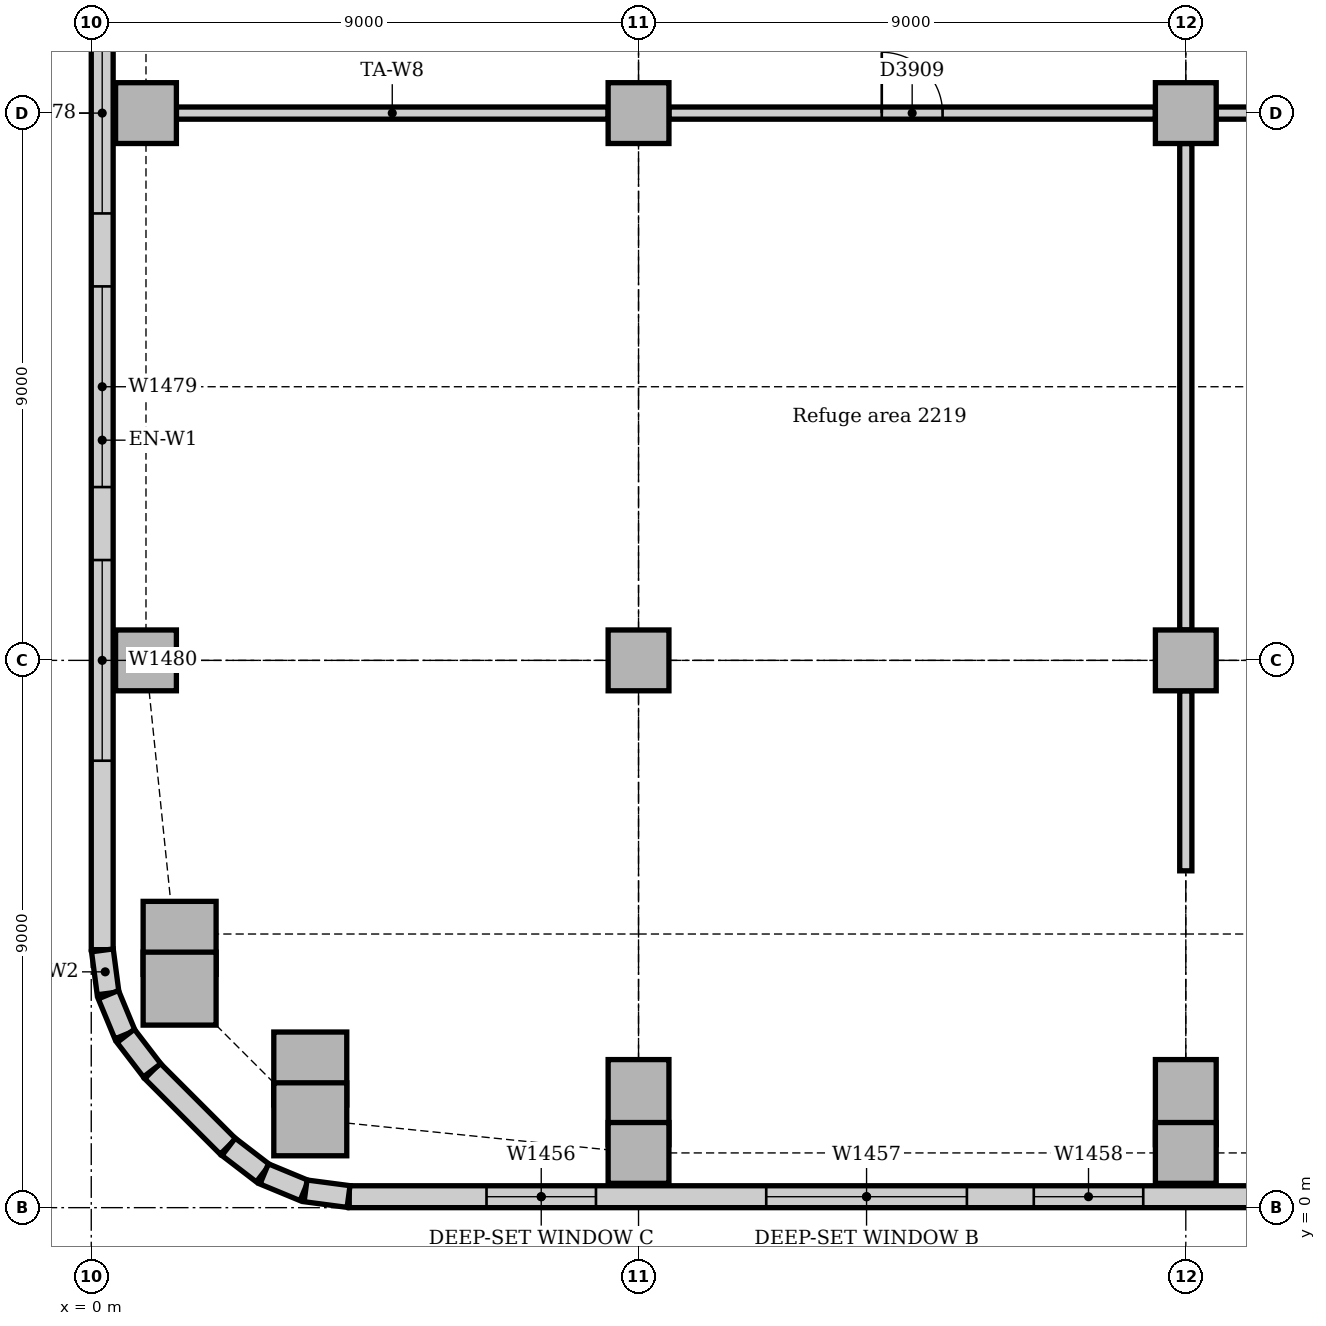
"""IFC4 building model, lengths in metres.
Left out: names, types, materials, properties, quantities, classifications, styles, units other than length and angle.
Written with IfcOpenShell. Run it as: python <this file> out.ifc"""

import sys

from ifc_helpers import new_model, si_unit, direction, frame, frame_2d, origin, origin_2d, place, context, subcontext, project, spatial, rectangle, extrude, element, fill, save


model = new_model("IFC4")
c1 = context("Model", 3, precision=1e-05, world=origin(), true_north=direction((0.0, 1.0)))
c2 = subcontext(c1, "Body", "Model", "MODEL_VIEW")
j1 = project(units=[si_unit("LENGTHUNIT", "METRE"), si_unit("PLANEANGLEUNIT", "RADIAN")], contexts=[c1])
p1 = place(None, origin())
s1 = spatial("IfcSite", under=j1, at=p1, CompositionType="ELEMENT")
p2 = place(p1, origin())
s2 = spatial("IfcBuilding", under=s1, at=p2, CompositionType="ELEMENT")
p3 = place(p2, frame((0.0, 0.0, 95.0)))
s3 = spatial("IfcBuildingStorey", under=s2, at=p3, CompositionType="ELEMENT", Elevation=95.0)
for number, where, z_axis, x_axis in (
    (1, (3.602, 1.453, 0.0), (0.0, 0.0, 1.0), (1.0, 0.0, 0.0)),
    (2, (1.453, 3.602, 0.0), (0.0, 0.0, 1.0), (1.0, 0.0, 0.0)),
):
    element("IfcColumn", number, at=place(p3, frame(where, z_axis=z_axis, x_axis=x_axis)), inside=s3, PredefinedType="COLUMN", context=c2, shape_type="SweptSolid", body=[
        extrude(rectangle(XDim=1.2, YDim=1.2, at=origin_2d()), origin(), (0.0, 0.0, 1.0), 4.85),
    ])
for number, where, z_axis, x_axis in (
    (3, (9.0, 0.9, 0.0), (0.0, 0.0, 1.0), (1.0, 0.0, 0.0)),
    (4, (18.0, 0.9, 0.0), (0.0, 0.0, 1.0), (1.0, 0.0, 0.0)),
    (5, (0.9, 9.0, 0.0), (0.0, 0.0, 1.0), (1.0, 0.0, 0.0)),
    (6, (0.9, 18.0, 0.0), (0.0, 0.0, 1.0), (1.0, 0.0, 0.0)),
    (7, (9.0, 9.0, 0.0), (0.0, 0.0, 1.0), (1.0, 0.0, 0.0)),
    (8, (9.0, 18.0, 0.0), (0.0, 0.0, 1.0), (1.0, 0.0, 0.0)),
    (9, (18.0, 9.0, 0.0), (0.0, 0.0, 1.0), (1.0, 0.0, 0.0)),
    (10, (18.0, 18.0, 0.0), (0.0, 0.0, 1.0), (1.0, 0.0, 0.0)),
):
    element("IfcColumn", number, at=place(p3, frame(where, z_axis=z_axis, x_axis=x_axis)), inside=s3, PredefinedType="COLUMN", context=c2, shape_type="SweptSolid", body=[
        extrude(rectangle(XDim=1.0, YDim=1.0, at=origin_2d()), origin(), (0.0, 0.0, 1.0), 4.85),
    ])
p4 = place(p3, frame((4.243, 0.18, 0.0), z_axis=(0.0, 0.0, 1.0), x_axis=(1.0, 0.0, 0.0)))
e11 = element("IfcWall", 11, at=p4, inside=s3, PredefinedType="STANDARD", context=c2, shape_type="SweptSolid", body=[
    extrude(rectangle(XDim=44.015, YDim=0.36, at=frame_2d((22.007, 0.0))), origin(), (0.0, 0.0, 1.0), 4.85),
])
p5 = place(p4, frame((2.257, 0.0, 1.2)))
e12 = element("IfcOpeningElement", 12, at=p5, cuts=e11, PredefinedType="OPENING", context=c2, shape_type="SweptSolid", body=[
    extrude(rectangle(XDim=1.8, YDim=1.2, at=frame_2d((0.9, 0.6))), frame((0.0, 0.19, 0.0), z_axis=(0.0, -1.0, 0.0), x_axis=(1.0, 0.0, 0.0)), (0.0, 0.0, 1.0), 0.38),
])
p6 = place(p4, frame((6.857, 0.0, 0.9)))
e13 = element("IfcOpeningElement", 13, at=p6, cuts=e11, PredefinedType="OPENING", context=c2, shape_type="SweptSolid", body=[
    extrude(rectangle(XDim=3.3, YDim=2.2, at=frame_2d((1.65, 1.1))), frame((0.0, 0.19, 0.0), z_axis=(0.0, -1.0, 0.0), x_axis=(1.0, 0.0, 0.0)), (0.0, 0.0, 1.0), 0.38),
])
p7 = place(p4, frame((11.257, 0.0, 1.2)))
e14 = element("IfcOpeningElement", 14, at=p7, cuts=e11, PredefinedType="OPENING", context=c2, shape_type="SweptSolid", body=[
    extrude(rectangle(XDim=1.8, YDim=1.2, at=frame_2d((0.9, 0.6))), frame((0.0, 0.19, 0.0), z_axis=(0.0, -1.0, 0.0), x_axis=(1.0, 0.0, 0.0)), (0.0, 0.0, 1.0), 0.38),
])
p8 = place(p4, frame((15.857, 0.0, 0.9)))
e15 = element("IfcOpeningElement", 15, at=p8, cuts=e11, PredefinedType="OPENING", context=c2, shape_type="SweptSolid", body=[
    extrude(rectangle(XDim=3.3, YDim=2.2, at=frame_2d((1.65, 1.1))), frame((0.0, 0.19, 0.0), z_axis=(0.0, -1.0, 0.0), x_axis=(1.0, 0.0, 0.0)), (0.0, 0.0, 1.0), 0.38),
])
p9 = place(p4, frame((20.257, 0.0, 1.2)))
e16 = element("IfcOpeningElement", 16, at=p9, cuts=e11, PredefinedType="OPENING", context=c2, shape_type="SweptSolid", body=[
    extrude(rectangle(XDim=1.8, YDim=1.2, at=frame_2d((0.9, 0.6))), frame((0.0, 0.19, 0.0), z_axis=(0.0, -1.0, 0.0), x_axis=(1.0, 0.0, 0.0)), (0.0, 0.0, 1.0), 0.38),
])
p10 = place(p4, frame((24.857, 0.0, 0.9)))
e17 = element("IfcOpeningElement", 17, at=p10, cuts=e11, PredefinedType="OPENING", context=c2, shape_type="SweptSolid", body=[
    extrude(rectangle(XDim=3.3, YDim=2.2, at=frame_2d((1.65, 1.1))), frame((0.0, 0.19, 0.0), z_axis=(0.0, -1.0, 0.0), x_axis=(1.0, 0.0, 0.0)), (0.0, 0.0, 1.0), 0.38),
])
p11 = place(p4, frame((29.257, 0.0, 1.2)))
e18 = element("IfcOpeningElement", 18, at=p11, cuts=e11, PredefinedType="OPENING", context=c2, shape_type="SweptSolid", body=[
    extrude(rectangle(XDim=1.8, YDim=1.2, at=frame_2d((0.9, 0.6))), frame((0.0, 0.19, 0.0), z_axis=(0.0, -1.0, 0.0), x_axis=(1.0, 0.0, 0.0)), (0.0, 0.0, 1.0), 0.38),
])
p12 = place(p4, frame((33.857, 0.0, 0.9)))
e19 = element("IfcOpeningElement", 19, at=p12, cuts=e11, PredefinedType="OPENING", context=c2, shape_type="SweptSolid", body=[
    extrude(rectangle(XDim=3.3, YDim=2.2, at=frame_2d((1.65, 1.1))), frame((0.0, 0.19, 0.0), z_axis=(0.0, -1.0, 0.0), x_axis=(1.0, 0.0, 0.0)), (0.0, 0.0, 1.0), 0.38),
])
p13 = place(p4, frame((38.583, 0.0, 0.9)))
e20 = element("IfcOpeningElement", 20, at=p13, cuts=e11, PredefinedType="OPENING", context=c2, shape_type="SweptSolid", body=[
    extrude(rectangle(XDim=1.8, YDim=2.2, at=frame_2d((0.9, 1.1))), frame((0.0, 0.19, 0.0), z_axis=(0.0, -1.0, 0.0), x_axis=(1.0, 0.0, 0.0)), (0.0, 0.0, 1.0), 0.38),
])
p14 = place(p3, frame((0.18, 21.0, 0.0), z_axis=(0.0, 0.0, 1.0), x_axis=(0.0, -1.0, 0.0)))
e21 = element("IfcWall", 21, at=p14, inside=s3, PredefinedType="STANDARD", context=c2, shape_type="SweptSolid", body=[
    extrude(rectangle(XDim=16.757, YDim=0.36, at=frame_2d((8.379, 0.0))), origin(), (0.0, 0.0, 1.0), 4.85),
])
p15 = place(p14, frame((1.35, 0.0, 0.9)))
e22 = element("IfcOpeningElement", 22, at=p15, cuts=e21, PredefinedType="OPENING", context=c2, shape_type="SweptSolid", body=[
    extrude(rectangle(XDim=3.3, YDim=2.2, at=frame_2d((1.65, 1.1))), frame((0.0, 0.19, 0.0), z_axis=(0.0, -1.0, 0.0), x_axis=(1.0, 0.0, 0.0)), (0.0, 0.0, 1.0), 0.38),
])
p16 = place(p14, frame((5.85, 0.0, 0.9)))
e23 = element("IfcOpeningElement", 23, at=p16, cuts=e21, PredefinedType="OPENING", context=c2, shape_type="SweptSolid", body=[
    extrude(rectangle(XDim=3.3, YDim=2.2, at=frame_2d((1.65, 1.1))), frame((0.0, 0.19, 0.0), z_axis=(0.0, -1.0, 0.0), x_axis=(1.0, 0.0, 0.0)), (0.0, 0.0, 1.0), 0.38),
])
p17 = place(p14, frame((10.35, 0.0, 0.9)))
e24 = element("IfcOpeningElement", 24, at=p17, cuts=e21, PredefinedType="OPENING", context=c2, shape_type="SweptSolid", body=[
    extrude(rectangle(XDim=3.3, YDim=2.2, at=frame_2d((1.65, 1.1))), frame((0.0, 0.19, 0.0), z_axis=(0.0, -1.0, 0.0), x_axis=(1.0, 0.0, 0.0)), (0.0, 0.0, 1.0), 0.38),
])
p18 = place(p3, frame((1.006, 2.249, 0.0), z_axis=(0.0, 0.0, 1.0), x_axis=(0.707106781187, -0.707106781187, 0.0)))
e25 = element("IfcWall", 25, at=p18, inside=s3, PredefinedType="STANDARD", context=c2, shape_type="SweptSolid", body=[
    extrude(rectangle(XDim=1.757, YDim=0.36, at=frame_2d((0.879, 0.0))), origin(), (0.0, 0.0, 1.0), 4.85),
])
for number, where, z_axis, x_axis in (
    (26, (0.183, 4.231, 0.0), (0.0, 0.0, 1.0), (0.131, -0.991, 0.0)),
    (27, (0.282, 3.503, 0.0), (0.0, 0.0, 1.0), (0.383, -0.924, 0.0)),
):
    element("IfcWall", number, at=place(p3, frame(where, z_axis=z_axis, x_axis=x_axis)), inside=s3, PredefinedType="STANDARD", context=c2, shape_type="SweptSolid", body=[
        extrude(rectangle(XDim=0.713, YDim=0.36, at=frame_2d((0.356, 0.0))), origin(), (0.0, 0.0, 1.0), 4.85),
    ])
for number, where, z_axis, x_axis in (
    (28, (0.566, 2.825, 0.0), (0.0, 0.0, 1.0), (0.609, -0.793, 0.0)),
    (29, (2.259, 1.0, 0.0), (0.0, 0.0, 1.0), (0.793, -0.609, 0.0)),
):
    element("IfcWall", number, at=place(p3, frame(where, z_axis=z_axis, x_axis=x_axis)), inside=s3, PredefinedType="STANDARD", context=c2, shape_type="SweptSolid", body=[
        extrude(rectangle(XDim=0.713, YDim=0.36, at=frame_2d((0.357, 0.0))), origin(), (0.0, 0.0, 1.0), 4.85),
    ])
for number, where, z_axis, x_axis in (
    (30, (2.844, 0.555, 0.0), (0.0, 0.0, 1.0), (0.924, -0.383, 0.0)),
    (31, (3.524, 0.276, 0.0), (0.0, 0.0, 1.0), (0.991, -0.131, 0.0)),
):
    element("IfcWall", number, at=place(p3, frame(where, z_axis=z_axis, x_axis=x_axis)), inside=s3, PredefinedType="STANDARD", context=c2, shape_type="SweptSolid", body=[
        extrude(rectangle(XDim=0.713, YDim=0.36, at=frame_2d((0.356, 0.0))), origin(), (0.0, 0.0, 1.0), 4.85),
    ])
p19 = place(p3, frame((18.5, 18.0, 0.0), z_axis=(0.0, 0.0, 1.0), x_axis=(1.0, 0.0, 0.0)))
e32 = element("IfcWall", 32, at=p19, inside=s3, PredefinedType="PARTITIONING", context=c2, shape_type="SweptSolid", body=[
    extrude(rectangle(XDim=8.0, YDim=0.2, at=frame_2d((4.0, 0.0))), origin(), (0.0, 0.0, 1.0), 4.158),
])
p20 = place(p19, frame((3.5, 0.0, 0.0)))
e33 = element("IfcOpeningElement", 33, at=p20, cuts=e32, PredefinedType="OPENING", context=c2, shape_type="SweptSolid", body=[
    extrude(rectangle(XDim=1.0, YDim=2.1, at=frame_2d((0.5, 1.05))), frame((0.0, 0.11, 0.0), z_axis=(0.0, -1.0, 0.0), x_axis=(1.0, 0.0, 0.0)), (0.0, 0.0, 1.0), 0.22),
])
p21 = place(p3, frame((9.5, 18.0, 0.0), z_axis=(0.0, 0.0, 1.0), x_axis=(1.0, 0.0, 0.0)))
e34 = element("IfcWall", 34, at=p21, inside=s3, PredefinedType="PARTITIONING", context=c2, shape_type="SweptSolid", body=[
    extrude(rectangle(XDim=8.0, YDim=0.2, at=frame_2d((4.0, 0.0))), origin(), (0.0, 0.0, 1.0), 4.158),
])
p22 = place(p21, frame((3.5, 0.0, 0.0)))
e35 = element("IfcOpeningElement", 35, at=p22, cuts=e34, PredefinedType="OPENING", context=c2, shape_type="SweptSolid", body=[
    extrude(rectangle(XDim=1.0, YDim=2.1, at=frame_2d((0.5, 1.05))), frame((0.0, 0.11, 0.0), z_axis=(0.0, -1.0, 0.0), x_axis=(1.0, 0.0, 0.0)), (0.0, 0.0, 1.0), 0.22),
])
p23 = place(p3, frame((1.4, 18.0, 0.0), z_axis=(0.0, 0.0, 1.0), x_axis=(1.0, 0.0, 0.0)))
e36 = element("IfcWall", 36, at=p23, inside=s3, PredefinedType="PARTITIONING", context=c2, shape_type="SweptSolid", body=[
    extrude(rectangle(XDim=7.1, YDim=0.2, at=frame_2d((3.55, 0.0))), origin(), (0.0, 0.0, 1.0), 4.158),
])
p24 = place(p3, frame((18.0, 5.539, 0.0), z_axis=(0.0, 0.0, 1.0), x_axis=(0.0, 1.0, 0.0)))
e37 = element("IfcWall", 37, at=p24, inside=s3, PredefinedType="PARTITIONING", context=c2, shape_type="SweptSolid", body=[
    extrude(rectangle(XDim=2.961, YDim=0.2, at=frame_2d((1.48, 0.0))), origin(), (0.0, 0.0, 1.0), 4.85),
])
p25 = place(p3, frame((18.0, 9.5, 0.0), z_axis=(0.0, 0.0, 1.0), x_axis=(0.0, 1.0, 0.0)))
e38 = element("IfcWall", 38, at=p25, inside=s3, PredefinedType="PARTITIONING", context=c2, shape_type="SweptSolid", body=[
    extrude(rectangle(XDim=8.0, YDim=0.2, at=frame_2d((4.0, 0.0))), origin(), (0.0, 0.0, 1.0), 4.256),
])
p26 = place(p5, origin())
e39 = element("IfcWindow", 39, at=p26, inside=s3, PartitioningType="SINGLE_PANEL", PredefinedType="WINDOW", context=c2, shape_type="SweptSolid", body=[
    extrude(rectangle(XDim=1.8, YDim=1.2, at=frame_2d((0.9, 0.6))), frame((0.0, 0.13, 0.0), z_axis=(0.0, -1.0, 0.0), x_axis=(1.0, 0.0, 0.0)), (0.0, 0.0, 1.0), 0.06),
])
fill(e12, e39)
p27 = place(p6, origin())
e40 = element("IfcWindow", 40, at=p27, inside=s3, PartitioningType="SINGLE_PANEL", PredefinedType="WINDOW", context=c2, shape_type="SweptSolid", body=[
    extrude(rectangle(XDim=3.3, YDim=2.2, at=frame_2d((1.65, 1.1))), frame((0.0, 0.13, 0.0), z_axis=(0.0, -1.0, 0.0), x_axis=(1.0, 0.0, 0.0)), (0.0, 0.0, 1.0), 0.06),
])
fill(e13, e40)
p28 = place(p7, origin())
e41 = element("IfcWindow", 41, at=p28, inside=s3, PartitioningType="SINGLE_PANEL", PredefinedType="WINDOW", context=c2, shape_type="SweptSolid", body=[
    extrude(rectangle(XDim=1.8, YDim=1.2, at=frame_2d((0.9, 0.6))), frame((0.0, 0.13, 0.0), z_axis=(0.0, -1.0, 0.0), x_axis=(1.0, 0.0, 0.0)), (0.0, 0.0, 1.0), 0.06),
])
fill(e14, e41)
p29 = place(p15, origin())
e42 = element("IfcWindow", 42, at=p29, inside=s3, PartitioningType="SINGLE_PANEL", PredefinedType="WINDOW", context=c2, shape_type="SweptSolid", body=[
    extrude(rectangle(XDim=3.3, YDim=2.2, at=frame_2d((1.65, 1.1))), frame((0.0, 0.13, 0.0), z_axis=(0.0, -1.0, 0.0), x_axis=(1.0, 0.0, 0.0)), (0.0, 0.0, 1.0), 0.06),
])
fill(e22, e42)
p30 = place(p16, origin())
e43 = element("IfcWindow", 43, at=p30, inside=s3, PartitioningType="SINGLE_PANEL", PredefinedType="WINDOW", context=c2, shape_type="SweptSolid", body=[
    extrude(rectangle(XDim=3.3, YDim=2.2, at=frame_2d((1.65, 1.1))), frame((0.0, 0.13, 0.0), z_axis=(0.0, -1.0, 0.0), x_axis=(1.0, 0.0, 0.0)), (0.0, 0.0, 1.0), 0.06),
])
fill(e23, e43)
p31 = place(p17, origin())
e44 = element("IfcWindow", 44, at=p31, inside=s3, PartitioningType="SINGLE_PANEL", PredefinedType="WINDOW", context=c2, shape_type="SweptSolid", body=[
    extrude(rectangle(XDim=3.3, YDim=2.2, at=frame_2d((1.65, 1.1))), frame((0.0, 0.13, 0.0), z_axis=(0.0, -1.0, 0.0), x_axis=(1.0, 0.0, 0.0)), (0.0, 0.0, 1.0), 0.06),
])
fill(e24, e44)
p32 = place(p22, origin())
e45 = element("IfcDoor", 45, at=p32, inside=s3, OperationType="SINGLE_SWING_LEFT", PredefinedType="DOOR", context=c2, shape_type="SweptSolid", body=[
    extrude(rectangle(XDim=1.0, YDim=2.1, at=frame_2d((0.5, 1.05))), frame((0.0, 0.025, 0.0), z_axis=(0.0, -1.0, 0.0), x_axis=(1.0, 0.0, 0.0)), (0.0, 0.0, 1.0), 0.05),
])
fill(e35, e45)
save(model, sys.argv[1])
